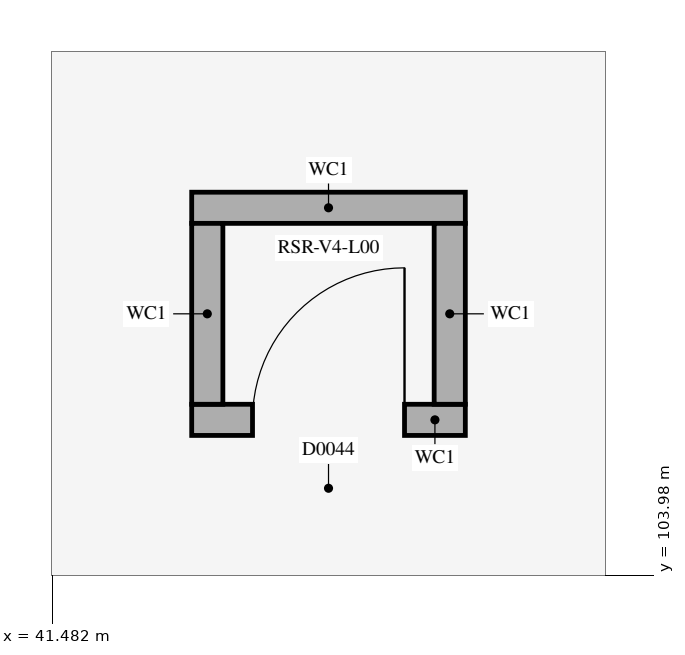
"""IFC4 building model, lengths in metres.
Left out: names, types, materials, properties, quantities, classifications, styles, units other than length and angle.
Written with IfcOpenShell. Run it as: python <this file> out.ifc"""

import sys

from ifc_helpers import new_model, si_unit, direction, frame, frame_2d, origin, place, context, subcontext, project, spatial, rectangle, extrude, element, fill, save


model = new_model("IFC4")
c1 = context("Model", 3, precision=1e-05, world=origin(), true_north=direction((0.0, 1.0)))
c2 = subcontext(c1, "Body", "Model", "MODEL_VIEW")
j1 = project(units=[si_unit("LENGTHUNIT", "METRE"), si_unit("PLANEANGLEUNIT", "RADIAN")], contexts=[c1])
p1 = place(None, origin())
s1 = spatial("IfcSite", under=j1, at=p1, CompositionType="ELEMENT")
p2 = place(p1, origin())
s2 = spatial("IfcBuilding", under=s1, at=p2, CompositionType="ELEMENT")
p3 = place(p2, origin())
s3 = spatial("IfcBuildingStorey", under=s2, at=p3, CompositionType="ELEMENT", Elevation=0.0)
p4 = place(p3, frame((42.4, 105.002, 0.0), z_axis=(0.0, 0.0, 1.0), x_axis=(1.0, 0.0, 0.0)))
e1 = element("IfcWall", 1, at=p4, inside=s3, PredefinedType="SOLIDWALL", context=c2, shape_type="SweptSolid", body=[
    extrude(rectangle(XDim=1.8, YDim=0.205, at=frame_2d((0.9, 0.0))), origin(), (0.0, 0.0, 1.0), 5.145),
])
p5 = place(p4, frame((0.4, 0.0, 0.0)))
e2 = element("IfcOpeningElement", 2, at=p5, cuts=e1, PredefinedType="OPENING", context=c2, shape_type="SweptSolid", body=[
    extrude(rectangle(XDim=1.0, YDim=2.2, at=frame_2d((0.5, 1.1))), frame((0.0, 0.115, 0.0), z_axis=(0.0, -1.0, 0.0), x_axis=(1.0, 0.0, 0.0)), (0.0, 0.0, 1.0), 0.229),
])
p6 = place(p3, frame((42.4, 106.397, 0.0), z_axis=(0.0, 0.0, 1.0), x_axis=(1.0, 0.0, 0.0)))
e3 = element("IfcWall", 3, at=p6, inside=s3, PredefinedType="SOLIDWALL", context=c2, shape_type="SweptSolid", body=[
    extrude(rectangle(XDim=1.8, YDim=0.205, at=frame_2d((0.9, 0.0))), origin(), (0.0, 0.0, 1.0), 5.145),
])
for number, where, z_axis, x_axis in (
    (4, (44.097, 105.105, 0.0), (0.0, 0.0, 1.0), (0.0, 1.0, 0.0)),
    (5, (42.502, 105.105, 0.0), (0.0, 0.0, 1.0), (0.0, 1.0, 0.0)),
):
    element("IfcWall", number, at=place(p3, frame(where, z_axis=z_axis, x_axis=x_axis)), inside=s3, PredefinedType="SOLIDWALL", context=c2, shape_type="SweptSolid", body=[
        extrude(rectangle(XDim=1.19, YDim=0.205, at=frame_2d((0.595, 0.0))), origin(), (0.0, 0.0, 1.0), 5.145),
    ])
p7 = place(p5, origin())
e6 = element("IfcDoor", 6, at=p7, inside=s3, OperationType="SINGLE_SWING_RIGHT", PredefinedType="DOOR", context=c2, shape_type="SweptSolid", body=[
    extrude(rectangle(XDim=1.0, YDim=2.2, at=frame_2d((0.5, 1.1))), frame((0.0, 0.025, 0.0), z_axis=(0.0, -1.0, 0.0), x_axis=(1.0, 0.0, 0.0)), (0.0, 0.0, 1.0), 0.05),
])
fill(e2, e6)
save(model, sys.argv[1])
